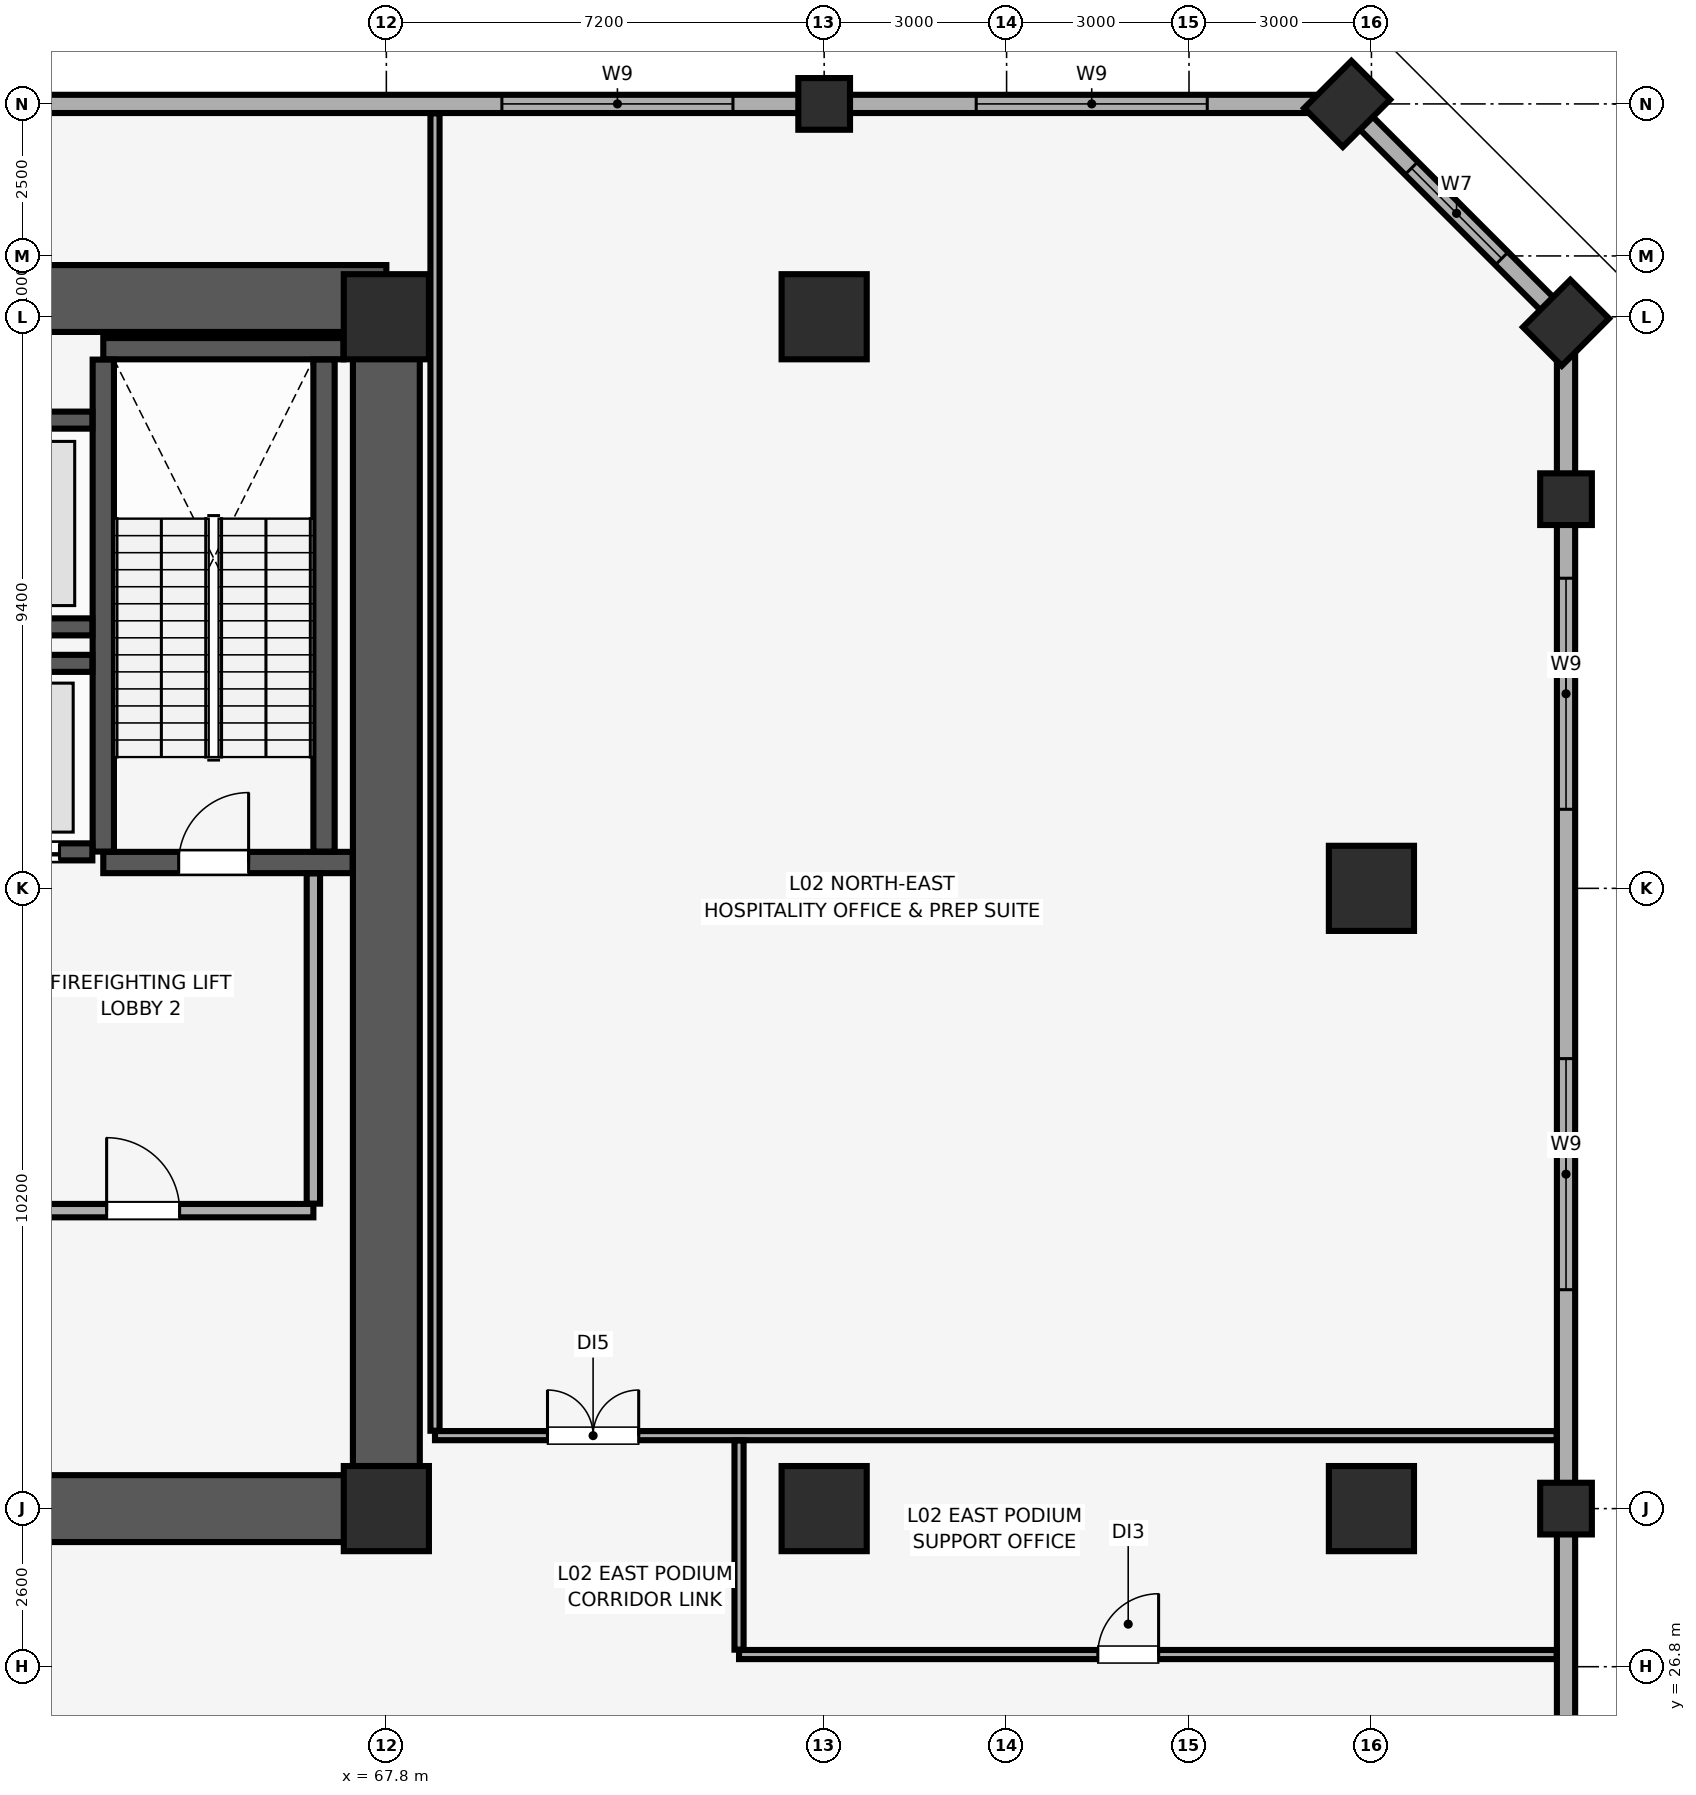
"""IFC4 building model, lengths in metres.
Left out: names, types, materials, properties, quantities, classifications, styles, units other than length and angle.
Written with IfcOpenShell. Run it as: python <this file> out.ifc"""

import sys

from ifc_helpers import new_model, si_unit, direction, frame, frame_2d, origin, origin_2d, place, context, subcontext, project, spatial, rectangle, extrude, element, fill, save


model = new_model("IFC4")
c1 = context("Model", 3, precision=1e-05, world=origin(), true_north=direction((0.0, 1.0)))
c2 = subcontext(c1, "Body", "Model", "MODEL_VIEW")
j1 = project(units=[si_unit("LENGTHUNIT", "METRE"), si_unit("PLANEANGLEUNIT", "RADIAN")], contexts=[c1])
p1 = place(None, origin())
s1 = spatial("IfcSite", under=j1, at=p1, CompositionType="ELEMENT")
p2 = place(p1, origin())
s2 = spatial("IfcBuilding", under=s1, at=p2, CompositionType="ELEMENT")
p3 = place(p2, frame((0.0, 0.0, 14.0)))
s3 = spatial("IfcBuildingStorey", under=s2, at=p3, CompositionType="ELEMENT", Elevation=14.0)
for number, where, z_axis, x_axis in (
    (1, (75.0, 52.5, 0.0), (0.0, 0.0, 1.0), (1.0, 0.0, 0.0)),
    (2, (87.2, 29.4, 0.0), (0.0, 0.0, 1.0), (1.0, 0.0, 0.0)),
    (3, (87.2, 46.0, 0.0), (0.0, 0.0, 1.0), (1.0, 0.0, 0.0)),
):
    element("IfcColumn", number, at=place(p3, frame(where, z_axis=z_axis, x_axis=x_axis)), inside=s3, PredefinedType="COLUMN", context=c2, shape_type="SweptSolid", body=[
        extrude(rectangle(XDim=0.85, YDim=0.85, at=origin_2d()), origin(), (0.0, 0.0, 1.0), 5.08),
    ])
for number, where, z_axis, x_axis in (
    (4, (87.2, 48.9, 0.0), (0.0, 0.0, 1.0), (0.707, 0.707, 0.0)),
    (5, (83.6, 52.5, 0.0), (0.0, 0.0, 1.0), (0.707, 0.707, 0.0)),
):
    element("IfcColumn", number, at=place(p3, frame(where, z_axis=z_axis, x_axis=x_axis)), inside=s3, PredefinedType="PILASTER", context=c2, shape_type="SweptSolid", body=[
        extrude(rectangle(XDim=1.1, YDim=0.9, at=origin_2d()), origin(), (0.0, 0.0, 1.0), 5.08),
    ])
for number, where, z_axis, x_axis in (
    (6, (67.8, 29.4, 0.0), (0.0, 0.0, 1.0), (1.0, 0.0, 0.0)),
    (7, (67.8, 49.0, 0.0), (0.0, 0.0, 1.0), (1.0, 0.0, 0.0)),
    (8, (75.0, 29.4, 0.0), (0.0, 0.0, 1.0), (1.0, 0.0, 0.0)),
    (9, (75.0, 49.0, 0.0), (0.0, 0.0, 1.0), (1.0, 0.0, 0.0)),
    (10, (84.0, 29.4, 0.0), (0.0, 0.0, 1.0), (1.0, 0.0, 0.0)),
    (11, (84.0, 39.6, 0.0), (0.0, 0.0, 1.0), (1.0, 0.0, 0.0)),
):
    element("IfcColumn", number, at=place(p3, frame(where, z_axis=z_axis, x_axis=x_axis)), inside=s3, PredefinedType="COLUMN", context=c2, shape_type="SweptSolid", body=[
        extrude(rectangle(XDim=1.4, YDim=1.4, at=origin_2d()), origin(), (0.0, 0.0, 1.0), 5.08),
    ])
p4 = place(p3, frame((87.2, 24.275, 0.0), z_axis=(0.0, 0.0, 1.0), x_axis=(0.0, 1.0, 0.0)))
e12 = element("IfcWall", 12, at=p4, inside=s3, PredefinedType="SOLIDWALL", context=c2, shape_type="SweptSolid", body=[
    extrude(rectangle(XDim=24.625, YDim=0.3, at=frame_2d((12.312, 0.0))), origin(), (0.0, 0.0, 1.0), 4.13),
])
p5 = place(p4, frame((8.725, 0.0, 0.85)))
e13 = element("IfcOpeningElement", 13, at=p5, cuts=e12, PredefinedType="OPENING", context=c2, shape_type="SweptSolid", body=[
    extrude(rectangle(XDim=3.8, YDim=2.2, at=frame_2d((1.9, 1.1))), frame((0.0, 0.16, 0.0), z_axis=(0.0, -1.0, 0.0), x_axis=(1.0, 0.0, 0.0)), (0.0, 0.0, 1.0), 0.32),
])
p6 = place(p4, frame((16.625, 0.0, 0.85)))
e14 = element("IfcOpeningElement", 14, at=p6, cuts=e12, PredefinedType="OPENING", context=c2, shape_type="SweptSolid", body=[
    extrude(rectangle(XDim=3.8, YDim=2.2, at=frame_2d((1.9, 1.1))), frame((0.0, 0.16, 0.0), z_axis=(0.0, -1.0, 0.0), x_axis=(1.0, 0.0, 0.0)), (0.0, 0.0, 1.0), 0.32),
])
p7 = place(p3, frame((87.2, 48.9, 0.0), z_axis=(0.0, 0.0, 1.0), x_axis=(-0.707082803744, 0.707130757816, 0.0)))
e15 = element("IfcWall", 15, at=p7, inside=s3, PredefinedType="SOLIDWALL", context=c2, shape_type="SweptSolid", body=[
    extrude(rectangle(XDim=5.091, YDim=0.3, at=frame_2d((2.545, 0.0))), origin(), (0.0, 0.0, 1.0), 4.13),
])
p8 = place(p7, frame((1.496, 0.0, 0.85)))
e16 = element("IfcOpeningElement", 16, at=p8, cuts=e15, PredefinedType="OPENING", context=c2, shape_type="SweptSolid", body=[
    extrude(rectangle(XDim=2.1, YDim=1.6, at=frame_2d((1.05, 0.8))), frame((0.0, 0.16, 0.0), z_axis=(0.0, -1.0, 0.0), x_axis=(1.0, 0.0, 0.0)), (0.0, 0.0, 1.0), 0.32),
])
p9 = place(p3, frame((83.6, 52.5, 0.0), z_axis=(0.0, 0.0, 1.0), x_axis=(-1.0, 0.0, 0.0)))
e17 = element("IfcWall", 17, at=p9, inside=s3, PredefinedType="SOLIDWALL", context=c2, shape_type="SweptSolid", body=[
    extrude(rectangle(XDim=83.2, YDim=0.3, at=frame_2d((41.6, 0.0))), origin(), (0.0, 0.0, 1.0), 4.13),
])
p10 = place(p9, frame((77.1, 0.0, 0.85)))
e18 = element("IfcOpeningElement", 18, at=p10, cuts=e17, PredefinedType="OPENING", context=c2, shape_type="SweptSolid", body=[
    extrude(rectangle(XDim=3.8, YDim=2.2, at=frame_2d((1.9, 1.1))), frame((0.0, 0.16, 0.0), z_axis=(0.0, -1.0, 0.0), x_axis=(1.0, 0.0, 0.0)), (0.0, 0.0, 1.0), 0.32),
])
p11 = place(p9, frame((69.15, 0.0, 0.85)))
e19 = element("IfcOpeningElement", 19, at=p11, cuts=e17, PredefinedType="OPENING", context=c2, shape_type="SweptSolid", body=[
    extrude(rectangle(XDim=3.8, YDim=2.2, at=frame_2d((1.9, 1.1))), frame((0.0, 0.16, 0.0), z_axis=(0.0, -1.0, 0.0), x_axis=(1.0, 0.0, 0.0)), (0.0, 0.0, 1.0), 0.32),
])
p12 = place(p9, frame((10.1, 0.0, 0.85)))
e20 = element("IfcOpeningElement", 20, at=p12, cuts=e17, PredefinedType="OPENING", context=c2, shape_type="SweptSolid", body=[
    extrude(rectangle(XDim=3.8, YDim=2.2, at=frame_2d((1.9, 1.1))), frame((0.0, 0.16, 0.0), z_axis=(0.0, -1.0, 0.0), x_axis=(1.0, 0.0, 0.0)), (0.0, 0.0, 1.0), 0.32),
])
p13 = place(p9, frame((2.3, 0.0, 0.85)))
e21 = element("IfcOpeningElement", 21, at=p13, cuts=e17, PredefinedType="OPENING", context=c2, shape_type="SweptSolid", body=[
    extrude(rectangle(XDim=3.8, YDim=2.2, at=frame_2d((1.9, 1.1))), frame((0.0, 0.16, 0.0), z_axis=(0.0, -1.0, 0.0), x_axis=(1.0, 0.0, 0.0)), (0.0, 0.0, 1.0), 0.32),
])
p14 = place(p3, frame((16.2, 49.3, 0.0), z_axis=(0.0, 0.0, 1.0), x_axis=(1.0, 0.0, 0.0)))
e22 = element("IfcWall", 22, at=p14, inside=s3, PredefinedType="SHEAR", context=c2, shape_type="SweptSolid", body=[
    extrude(rectangle(XDim=51.6, YDim=1.1, at=frame_2d((25.8, 0.0))), origin(), (0.0, 0.0, 1.0), 5.08),
])
p15 = place(p3, frame((67.8, 29.4, 0.0), z_axis=(0.0, 0.0, 1.0), x_axis=(0.0, 1.0, 0.0)))
e23 = element("IfcWall", 23, at=p15, inside=s3, PredefinedType="SHEAR", context=c2, shape_type="SweptSolid", body=[
    extrude(rectangle(XDim=19.2, YDim=1.1, at=frame_2d((9.6, 0.0))), origin(), (0.0, 0.0, 1.0), 5.08),
])
p16 = place(p3, frame((60.4, 29.4, 0.0), z_axis=(0.0, 0.0, 1.0), x_axis=(1.0, 0.0, 0.0)))
e24 = element("IfcWall", 24, at=p16, inside=s3, PredefinedType="SHEAR", context=c2, shape_type="SweptSolid", body=[
    extrude(rectangle(XDim=6.845, YDim=1.1, at=frame_2d((3.423, 0.0))), origin(), (0.0, 0.0, 1.0), 5.08),
])
p17 = place(p3, frame((63.145, 40.025, 0.0), z_axis=(0.0, 0.0, 1.0), x_axis=(1.0, 0.0, 0.0)))
e25 = element("IfcWall", 25, at=p17, inside=s3, PredefinedType="SHEAR", context=c2, shape_type="SweptSolid", body=[
    extrude(rectangle(XDim=4.1, YDim=0.35, at=frame_2d((2.05, 0.0))), origin(), (0.0, 0.0, 1.0), 5.08),
])
p18 = place(p17, frame((1.24, 0.0, 0.0)))
e26 = element("IfcOpeningElement", 26, at=p18, cuts=e25, PredefinedType="OPENING", context=c2, shape_type="SweptSolid", body=[
    extrude(rectangle(XDim=1.15, YDim=2.15, at=frame_2d((0.575, 1.075))), frame((0.0, 0.185, 0.0), z_axis=(0.0, -1.0, 0.0), x_axis=(1.0, 0.0, 0.0)), (0.0, 0.0, 1.0), 0.37),
])
p19 = place(p3, frame((63.145, 48.475, 0.0), z_axis=(0.0, 0.0, 1.0), x_axis=(1.0, 0.0, 0.0)))
e27 = element("IfcWall", 27, at=p19, inside=s3, PredefinedType="SHEAR", context=c2, shape_type="SweptSolid", body=[
    extrude(rectangle(XDim=3.95, YDim=0.35, at=frame_2d((1.975, 0.0))), origin(), (0.0, 0.0, 1.0), 5.08),
])
for number, where, z_axis, x_axis in (
    (28, (63.145, 40.205, 0.0), (0.0, 0.0, 1.0), (0.0, 1.0, 0.0)),
    (29, (66.775, 40.205, 0.0), (0.0, 0.0, 1.0), (0.0, 1.0, 0.0)),
):
    element("IfcWall", number, at=place(p3, frame(where, z_axis=z_axis, x_axis=x_axis)), inside=s3, PredefinedType="SHEAR", context=c2, shape_type="SweptSolid", body=[
        extrude(rectangle(XDim=8.09, YDim=0.35, at=frame_2d((4.045, 0.0))), origin(), (0.0, 0.0, 1.0), 5.08),
    ])
p20 = place(p3, frame((60.55, 40.2, 0.0), z_axis=(0.0, 0.0, 1.0), x_axis=(1.0, 0.0, 0.0)))
e30 = element("IfcWall", 30, at=p20, inside=s3, PredefinedType="SHEAR", context=c2, shape_type="SweptSolid", body=[
    extrude(rectangle(XDim=2.415, YDim=0.28, at=frame_2d((1.208, 0.0))), origin(), (0.0, 0.0, 1.0), 5.08),
])
p21 = place(p20, frame((0.575, 0.0, 0.0)))
e31 = element("IfcOpeningElement", 31, at=p21, cuts=e30, PredefinedType="OPENING", context=c2, shape_type="SweptSolid", body=[
    extrude(rectangle(XDim=1.3, YDim=2.3, at=frame_2d((0.65, 1.15))), frame((0.0, 0.15, 0.0), z_axis=(0.0, -1.0, 0.0), x_axis=(1.0, 0.0, 0.0)), (0.0, 0.0, 1.0), 0.3),
])
for number, where, z_axis, x_axis in (
    (32, (60.55, 43.3, 0.0), (0.0, 0.0, 1.0), (1.0, 0.0, 0.0)),
    (33, (60.55, 43.9, 0.0), (0.0, 0.0, 1.0), (1.0, 0.0, 0.0)),
    (34, (60.55, 47.3, 0.0), (0.0, 0.0, 1.0), (1.0, 0.0, 0.0)),
):
    element("IfcWall", number, at=place(p3, frame(where, z_axis=z_axis, x_axis=x_axis)), inside=s3, PredefinedType="SHEAR", context=c2, shape_type="SweptSolid", body=[
        extrude(rectangle(XDim=2.415, YDim=0.28, at=frame_2d((1.208, 0.0))), origin(), (0.0, 0.0, 1.0), 5.08),
    ])
p22 = place(p3, frame((60.55, 34.3, 0.0), z_axis=(0.0, 0.0, 1.0), x_axis=(1.0, 0.0, 0.0)))
e35 = element("IfcWall", 35, at=p22, inside=s3, PredefinedType="PARTITIONING", context=c2, shape_type="SweptSolid", body=[
    extrude(rectangle(XDim=6.05, YDim=0.22, at=frame_2d((3.025, 0.0))), origin(), (0.0, 0.0, 1.0), 5.08),
])
p23 = place(p22, frame((2.65, 0.0, 0.0)))
e36 = element("IfcOpeningElement", 36, at=p23, cuts=e35, PredefinedType="OPENING", context=c2, shape_type="SweptSolid", body=[
    extrude(rectangle(XDim=1.2, YDim=2.15, at=frame_2d((0.6, 1.075))), frame((0.0, 0.12, 0.0), z_axis=(0.0, -1.0, 0.0), x_axis=(1.0, 0.0, 0.0)), (0.0, 0.0, 1.0), 0.24),
])
p24 = place(p3, frame((66.6, 34.415, 0.0), z_axis=(0.0, 0.0, 1.0), x_axis=(0.0, 1.0, 0.0)))
e37 = element("IfcWall", 37, at=p24, inside=s3, PredefinedType="PARTITIONING", context=c2, shape_type="SweptSolid", body=[
    extrude(rectangle(XDim=5.43, YDim=0.22, at=frame_2d((2.715, 0.0))), origin(), (0.0, 0.0, 1.0), 5.08),
])
p25 = place(p3, frame((68.6, 30.6, 0.0), z_axis=(0.0, 0.0, 1.0), x_axis=(1.0, 0.0, 0.0)))
e38 = element("IfcWall", 38, at=p25, inside=s3, PredefinedType="PARTITIONING", context=c2, shape_type="SweptSolid", body=[
    extrude(rectangle(XDim=18.445, YDim=0.15, at=frame_2d((9.222, 0.0))), origin(), (0.0, 0.0, 1.0), 5.08),
])
p26 = place(p25, frame((1.85, 0.0, 0.0)))
e39 = element("IfcOpeningElement", 39, at=p26, cuts=e38, PredefinedType="OPENING", context=c2, shape_type="SweptSolid", body=[
    extrude(rectangle(XDim=1.5, YDim=2.25, at=frame_2d((0.75, 1.125))), frame((0.0, 0.085, 0.0), z_axis=(0.0, -1.0, 0.0), x_axis=(1.0, 0.0, 0.0)), (0.0, 0.0, 1.0), 0.17),
])
p27 = place(p3, frame((68.6, 30.68, 0.0), z_axis=(0.0, 0.0, 1.0), x_axis=(0.0, 1.0, 0.0)))
e40 = element("IfcWall", 40, at=p27, inside=s3, PredefinedType="PARTITIONING", context=c2, shape_type="SweptSolid", body=[
    extrude(rectangle(XDim=21.665, YDim=0.15, at=frame_2d((10.833, 0.0))), origin(), (0.0, 0.0, 1.0), 5.08),
])
p28 = place(p3, frame((73.6, 27.0, 0.0), z_axis=(0.0, 0.0, 1.0), x_axis=(1.0, 0.0, 0.0)))
e41 = element("IfcWall", 41, at=p28, inside=s3, PredefinedType="PARTITIONING", context=c2, shape_type="SweptSolid", body=[
    extrude(rectangle(XDim=13.445, YDim=0.15, at=frame_2d((6.722, 0.0))), origin(), (0.0, 0.0, 1.0), 5.08),
])
p29 = place(p28, frame((5.9, 0.0, 0.0)))
e42 = element("IfcOpeningElement", 42, at=p29, cuts=e41, PredefinedType="OPENING", context=c2, shape_type="SweptSolid", body=[
    extrude(rectangle(XDim=1.0, YDim=2.15, at=frame_2d((0.5, 1.075))), frame((0.0, 0.085, 0.0), z_axis=(0.0, -1.0, 0.0), x_axis=(1.0, 0.0, 0.0)), (0.0, 0.0, 1.0), 0.17),
])
p30 = place(p3, frame((73.6, 27.08, 0.0), z_axis=(0.0, 0.0, 1.0), x_axis=(0.0, 1.0, 0.0)))
e43 = element("IfcWall", 43, at=p30, inside=s3, PredefinedType="PARTITIONING", context=c2, shape_type="SweptSolid", body=[
    extrude(rectangle(XDim=3.44, YDim=0.15, at=frame_2d((1.72, 0.0))), origin(), (0.0, 0.0, 1.0), 5.08),
])
p31 = place(p8, origin())
e44 = element("IfcWindow", 44, at=p31, inside=s3, PartitioningType="SINGLE_PANEL", PredefinedType="WINDOW", context=c2, shape_type="SweptSolid", body=[
    extrude(rectangle(XDim=2.1, YDim=1.6, at=frame_2d((1.05, 0.8))), frame((0.0, 0.03, 0.0), z_axis=(0.0, -1.0, 0.0), x_axis=(1.0, 0.0, 0.0)), (0.0, 0.0, 1.0), 0.06),
])
fill(e16, e44)
p32 = place(p5, origin())
e45 = element("IfcWindow", 45, at=p32, inside=s3, PartitioningType="SINGLE_PANEL", PredefinedType="WINDOW", context=c2, shape_type="SweptSolid", body=[
    extrude(rectangle(XDim=3.8, YDim=2.2, at=frame_2d((1.9, 1.1))), frame((0.0, 0.03, 0.0), z_axis=(0.0, -1.0, 0.0), x_axis=(1.0, 0.0, 0.0)), (0.0, 0.0, 1.0), 0.06),
])
fill(e13, e45)
p33 = place(p6, origin())
e46 = element("IfcWindow", 46, at=p33, inside=s3, PartitioningType="SINGLE_PANEL", PredefinedType="WINDOW", context=c2, shape_type="SweptSolid", body=[
    extrude(rectangle(XDim=3.8, YDim=2.2, at=frame_2d((1.9, 1.1))), frame((0.0, 0.03, 0.0), z_axis=(0.0, -1.0, 0.0), x_axis=(1.0, 0.0, 0.0)), (0.0, 0.0, 1.0), 0.06),
])
fill(e14, e46)
p34 = place(p12, origin())
e47 = element("IfcWindow", 47, at=p34, inside=s3, PartitioningType="SINGLE_PANEL", PredefinedType="WINDOW", context=c2, shape_type="SweptSolid", body=[
    extrude(rectangle(XDim=3.8, YDim=2.2, at=frame_2d((1.9, 1.1))), frame((0.0, 0.03, 0.0), z_axis=(0.0, -1.0, 0.0), x_axis=(1.0, 0.0, 0.0)), (0.0, 0.0, 1.0), 0.06),
])
fill(e20, e47)
p35 = place(p13, origin())
e48 = element("IfcWindow", 48, at=p35, inside=s3, PartitioningType="SINGLE_PANEL", PredefinedType="WINDOW", context=c2, shape_type="SweptSolid", body=[
    extrude(rectangle(XDim=3.8, YDim=2.2, at=frame_2d((1.9, 1.1))), frame((0.0, 0.03, 0.0), z_axis=(0.0, -1.0, 0.0), x_axis=(1.0, 0.0, 0.0)), (0.0, 0.0, 1.0), 0.06),
])
fill(e21, e48)
p36 = place(p18, origin())
e49 = element("IfcDoor", 49, at=p36, inside=s3, OperationType="SINGLE_SWING_RIGHT", PredefinedType="DOOR", context=c2, shape_type="SweptSolid", body=[
    extrude(rectangle(XDim=1.15, YDim=2.15, at=frame_2d((0.575, 1.075))), frame((0.0, 0.025, 0.0), z_axis=(0.0, -1.0, 0.0), x_axis=(1.0, 0.0, 0.0)), (0.0, 0.0, 1.0), 0.05),
])
fill(e26, e49)
p37 = place(p21, origin())
e50 = element("IfcDoor", 50, at=p37, inside=s3, OperationType="DOUBLE_DOOR_SLIDING", PredefinedType="DOOR", context=c2, shape_type="SweptSolid", body=[
    extrude(rectangle(XDim=1.3, YDim=2.3, at=frame_2d((0.65, 1.15))), frame((0.0, 0.025, 0.0), z_axis=(0.0, -1.0, 0.0), x_axis=(1.0, 0.0, 0.0)), (0.0, 0.0, 1.0), 0.05),
])
fill(e31, e50)
p38 = place(p23, origin())
e51 = element("IfcDoor", 51, at=p38, inside=s3, OperationType="SINGLE_SWING_LEFT", PredefinedType="DOOR", context=c2, shape_type="SweptSolid", body=[
    extrude(rectangle(XDim=1.2, YDim=2.15, at=frame_2d((0.6, 1.075))), frame((0.0, 0.025, 0.0), z_axis=(0.0, -1.0, 0.0), x_axis=(1.0, 0.0, 0.0)), (0.0, 0.0, 1.0), 0.05),
])
fill(e36, e51)
p39 = place(p26, origin())
e52 = element("IfcDoor", 52, at=p39, inside=s3, OperationType="DOUBLE_DOOR_SINGLE_SWING", PredefinedType="DOOR", context=c2, shape_type="SweptSolid", body=[
    extrude(rectangle(XDim=1.5, YDim=2.25, at=frame_2d((0.75, 1.125))), frame((0.0, 0.025, 0.0), z_axis=(0.0, -1.0, 0.0), x_axis=(1.0, 0.0, 0.0)), (0.0, 0.0, 1.0), 0.05),
])
fill(e39, e52)
p40 = place(p29, origin())
e53 = element("IfcDoor", 53, at=p40, inside=s3, OperationType="SINGLE_SWING_RIGHT", PredefinedType="DOOR", context=c2, shape_type="SweptSolid", body=[
    extrude(rectangle(XDim=1.0, YDim=2.15, at=frame_2d((0.5, 1.075))), frame((0.0, 0.025, 0.0), z_axis=(0.0, -1.0, 0.0), x_axis=(1.0, 0.0, 0.0)), (0.0, 0.0, 1.0), 0.05),
])
fill(e42, e53)
save(model, sys.argv[1])
